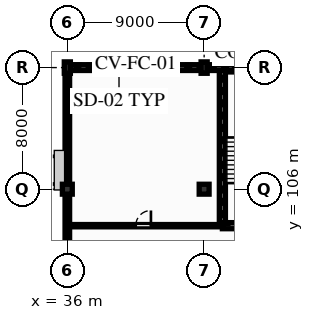
"""IFC4 building model, lengths in metres.
Left out: names, types, materials, properties, quantities, classifications, styles, units other than length and angle.
Written with IfcOpenShell. Run it as: python <this file> out.ifc"""

import sys

from ifc_helpers import new_model, si_unit, direction, frame, frame_2d, origin, origin_2d, place, context, subcontext, project, spatial, rectangle, extrude, element, fill, save


model = new_model("IFC4")
c1 = context("Model", 3, precision=1e-05, world=origin(), true_north=direction((0.0, 1.0)))
c2 = subcontext(c1, "Body", "Model", "MODEL_VIEW")
j1 = project(units=[si_unit("LENGTHUNIT", "METRE"), si_unit("PLANEANGLEUNIT", "RADIAN")], contexts=[c1])
p1 = place(None, origin())
s1 = spatial("IfcSite", under=j1, at=p1, CompositionType="ELEMENT")
p2 = place(p1, origin())
s2 = spatial("IfcBuilding", under=s1, at=p2, CompositionType="ELEMENT")
p3 = place(p2, frame((0.0, 0.0, 16.52)))
s3 = spatial("IfcBuildingStorey", under=s2, at=p3, CompositionType="ELEMENT", Elevation=16.52)
p4 = place(p3, frame((36.0, 106.0, 0.0), z_axis=(0.0, 0.0, 1.0), x_axis=(1.0, 0.0, 0.0)))
e1 = element("IfcColumn", 1, at=p4, inside=s3, PredefinedType="COLUMN", context=c2, shape_type="SweptSolid", body=[
    extrude(rectangle(XDim=0.65, YDim=0.65, at=origin_2d()), origin(), (0.0, 0.0, 1.0), 3.74),
])
p5 = place(p3, frame((36.0, 114.0, 0.0), z_axis=(0.0, 0.0, 1.0), x_axis=(0.0, 1.0, 0.0)))
e2 = element("IfcColumn", 2, at=p5, inside=s3, PredefinedType="COLUMN", context=c2, shape_type="SweptSolid", body=[
    extrude(rectangle(XDim=0.4, YDim=0.75, at=origin_2d()), origin(), (0.0, 0.0, 1.0), 3.74),
])
p6 = place(p3, frame((45.0, 106.0, 0.0), z_axis=(0.0, 0.0, 1.0), x_axis=(1.0, 0.0, 0.0)))
e3 = element("IfcColumn", 3, at=p6, inside=s3, PredefinedType="COLUMN", context=c2, shape_type="SweptSolid", body=[
    extrude(rectangle(XDim=0.65, YDim=0.65, at=origin_2d()), origin(), (0.0, 0.0, 1.0), 3.74),
])
p7 = place(p3, frame((45.0, 114.0, 0.0), z_axis=(0.0, 0.0, 1.0), x_axis=(0.0, 1.0, 0.0)))
e4 = element("IfcColumn", 4, at=p7, inside=s3, PredefinedType="COLUMN", context=c2, shape_type="SweptSolid", body=[
    extrude(rectangle(XDim=0.4, YDim=0.75, at=origin_2d()), origin(), (0.0, 0.0, 1.0), 3.74),
])
p8 = place(p3, frame((36.0, 114.0, 0.0), z_axis=(0.0, 0.0, 1.0), x_axis=(1.0, 0.0, 0.0)))
e5 = element("IfcWall", 5, at=p8, inside=s3, PredefinedType="SOLIDWALL", context=c2, shape_type="SweptSolid", body=[
    extrude(rectangle(XDim=9.0, YDim=0.38, at=frame_2d((4.5, 0.0))), origin(), (0.0, 0.0, 1.0), 3.46),
])
p9 = place(p8, frame((2.4, 0.0, 0.845)))
e6 = element("IfcOpeningElement", 6, at=p9, cuts=e5, PredefinedType="OPENING", context=c2, shape_type="SweptSolid", body=[
    extrude(rectangle(XDim=2.0, YDim=1.9, at=frame_2d((1.0, 0.95))), frame((0.0, 0.2, 0.0), z_axis=(0.0, -1.0, 0.0), x_axis=(1.0, 0.0, 0.0)), (0.0, 0.0, 1.0), 0.4),
])
p10 = place(p3, frame((45.0, 114.0, 0.0), z_axis=(0.0, 0.0, 1.0), x_axis=(1.0, 0.0, 0.0)))
e7 = element("IfcWall", 7, at=p10, inside=s3, PredefinedType="SOLIDWALL", context=c2, shape_type="SweptSolid", body=[
    extrude(rectangle(XDim=9.0, YDim=0.38, at=frame_2d((4.5, 0.0))), origin(), (0.0, 0.0, 1.0), 3.46),
])
p11 = place(p3, frame((36.0, 90.0, 0.0), z_axis=(0.0, 0.0, 1.0), x_axis=(0.0, 1.0, 0.0)))
e8 = element("IfcWall", 8, at=p11, inside=s3, PredefinedType="SOLIDWALL", context=c2, shape_type="SweptSolid", body=[
    extrude(rectangle(XDim=24.0, YDim=0.3, at=frame_2d((12.0, 0.0))), origin(), (0.0, 0.0, 1.0), 2.785),
])
p12 = place(p11, frame((3.0, 0.0, 0.815)))
e9 = element("IfcOpeningElement", 9, at=p12, cuts=e8, PredefinedType="OPENING", context=c2, shape_type="SweptSolid", body=[
    extrude(rectangle(XDim=1.35, YDim=1.85, at=frame_2d((0.675, 0.925))), frame((0.0, 0.16, 0.0), z_axis=(0.0, -1.0, 0.0), x_axis=(1.0, 0.0, 0.0)), (0.0, 0.0, 1.0), 0.32),
])
p13 = place(p11, frame((11.7, 0.0, 0.915)))
e10 = element("IfcOpeningElement", 10, at=p13, cuts=e8, PredefinedType="OPENING", context=c2, shape_type="SweptSolid", body=[
    extrude(rectangle(XDim=1.05, YDim=1.75, at=frame_2d((0.525, 0.875))), frame((0.0, 0.16, 0.0), z_axis=(0.0, -1.0, 0.0), x_axis=(1.0, 0.0, 0.0)), (0.0, 0.0, 1.0), 0.32),
])
p14 = place(p11, frame((16.5, 0.0, 0.565)))
e11 = element("IfcOpeningElement", 11, at=p14, cuts=e8, PredefinedType="OPENING", context=c2, shape_type="SweptSolid", body=[
    extrude(rectangle(XDim=1.5, YDim=2.1, at=frame_2d((0.75, 1.05))), frame((0.0, 0.16, 0.0), z_axis=(0.0, -1.0, 0.0), x_axis=(1.0, 0.0, 0.0)), (0.0, 0.0, 1.0), 0.32),
])
p15 = place(p3, frame((46.2, 103.6, 0.0), z_axis=(0.0, 0.0, 1.0), x_axis=(1.0, 0.0, 0.0)))
e12 = element("IfcWall", 12, at=p15, inside=s3, PredefinedType="SHEAR", context=c2, shape_type="SweptSolid", body=[
    extrude(rectangle(XDim=13.2, YDim=0.4, at=frame_2d((6.6, 0.0))), origin(), (0.0, 0.0, 1.0), 3.46),
])
p16 = place(p15, frame((5.8, 0.0, 0.0)))
e13 = element("IfcOpeningElement", 13, at=p16, cuts=e12, PredefinedType="OPENING", context=c2, shape_type="SweptSolid", body=[
    extrude(rectangle(XDim=1.5, YDim=2.2, at=frame_2d((0.75, 1.1))), frame((0.0, 0.21, 0.0), z_axis=(0.0, -1.0, 0.0), x_axis=(1.0, 0.0, 0.0)), (0.0, 0.0, 1.0), 0.42),
])
p17 = place(p3, frame((46.2, 103.8, 0.0), z_axis=(0.0, 0.0, 1.0), x_axis=(0.0, 1.0, 0.0)))
e14 = element("IfcWall", 14, at=p17, inside=s3, PredefinedType="SHEAR", context=c2, shape_type="SweptSolid", body=[
    extrude(rectangle(XDim=10.01, YDim=0.4, at=frame_2d((5.005, 0.0))), origin(), (0.0, 0.0, 1.0), 3.46),
])
p18 = place(p3, frame((36.0, 103.6, 0.0), z_axis=(0.0, 0.0, 1.0), x_axis=(1.0, 0.0, 0.0)))
e15 = element("IfcWall", 15, at=p18, inside=s3, PredefinedType="PARTITIONING", context=c2, shape_type="SweptSolid", body=[
    extrude(rectangle(XDim=10.2, YDim=0.15, at=frame_2d((5.1, 0.0))), origin(), (0.0, 0.0, 1.0), 3.46),
])
p19 = place(p18, frame((4.5, 0.0, 0.0)))
e16 = element("IfcOpeningElement", 16, at=p19, cuts=e15, PredefinedType="OPENING", context=c2, shape_type="SweptSolid", body=[
    extrude(rectangle(XDim=1.0, YDim=2.15, at=frame_2d((0.5, 1.075))), frame((0.0, 0.085, 0.0), z_axis=(0.0, -1.0, 0.0), x_axis=(1.0, 0.0, 0.0)), (0.0, 0.0, 1.0), 0.17),
])
p20 = place(p9, origin())
e17 = element("IfcWindow", 17, at=p20, inside=s3, PartitioningType="SINGLE_PANEL", PredefinedType="WINDOW", context=c2, shape_type="SweptSolid", body=[
    extrude(rectangle(XDim=2.0, YDim=1.9, at=frame_2d((1.0, 0.95))), frame((0.0, 0.03, 0.0), z_axis=(0.0, -1.0, 0.0), x_axis=(1.0, 0.0, 0.0)), (0.0, 0.0, 1.0), 0.06),
])
fill(e6, e17)
p21 = place(p13, origin())
e18 = element("IfcWindow", 18, at=p21, inside=s3, PartitioningType="SINGLE_PANEL", PredefinedType="WINDOW", context=c2, shape_type="SweptSolid", body=[
    extrude(rectangle(XDim=1.05, YDim=1.75, at=frame_2d((0.525, 0.875))), frame((0.0, 0.03, 0.0), z_axis=(0.0, -1.0, 0.0), x_axis=(1.0, 0.0, 0.0)), (0.0, 0.0, 1.0), 0.06),
])
fill(e10, e18)
p22 = place(p14, origin())
e19 = element("IfcWindow", 19, at=p22, inside=s3, PartitioningType="SINGLE_PANEL", PredefinedType="WINDOW", context=c2, shape_type="SweptSolid", body=[
    extrude(rectangle(XDim=1.5, YDim=2.1, at=frame_2d((0.75, 1.05))), frame((0.0, 0.03, 0.0), z_axis=(0.0, -1.0, 0.0), x_axis=(1.0, 0.0, 0.0)), (0.0, 0.0, 1.0), 0.06),
])
fill(e11, e19)
p23 = place(p19, origin())
e20 = element("IfcDoor", 20, at=p23, inside=s3, OperationType="SINGLE_SWING_RIGHT", PredefinedType="DOOR", context=c2, shape_type="SweptSolid", body=[
    extrude(rectangle(XDim=1.0, YDim=2.15, at=frame_2d((0.5, 1.075))), frame((0.0, 0.025, 0.0), z_axis=(0.0, -1.0, 0.0), x_axis=(1.0, 0.0, 0.0)), (0.0, 0.0, 1.0), 0.05),
])
fill(e16, e20)
save(model, sys.argv[1])
